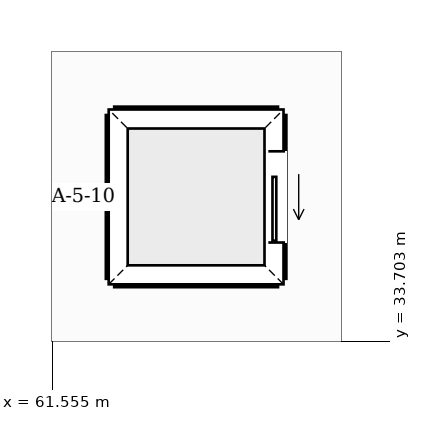
"""IFC4 building model, lengths in metres.
Left out: names, types, materials, properties, quantities, classifications, styles, units other than length and angle.
Written with IfcOpenShell. Run it as: python <this file> out.ifc"""

import sys

from ifc_helpers import new_model, si_unit, direction, frame, frame_2d, origin, place, context, subcontext, project, spatial, rectangle, extrude, element, fill, save


model = new_model("IFC4")
c1 = context("Model", 3, precision=1e-05, world=origin(), true_north=direction((0.0, 1.0)))
c2 = subcontext(c1, "Body", "Model", "MODEL_VIEW")
j1 = project(units=[si_unit("LENGTHUNIT", "METRE"), si_unit("PLANEANGLEUNIT", "RADIAN")], contexts=[c1])
p1 = place(None, origin())
s1 = spatial("IfcSite", under=j1, at=p1, CompositionType="ELEMENT")
p2 = place(p1, origin())
s2 = spatial("IfcBuilding", under=s1, at=p2, CompositionType="ELEMENT")
p3 = place(p2, frame((0.0, 0.0, -5.4)))
s3 = spatial("IfcBuildingStorey", under=s2, at=p3, CompositionType="ELEMENT", Elevation=-5.4)
for number, where, z_axis, x_axis in (
    (1, (62.39, 36.66, 0.0), (0.0, 0.0, 1.0), (1.0, 0.0, 0.0)),
    (2, (62.39, 34.54, 0.0), (0.0, 0.0, 1.0), (1.0, 0.0, 0.0)),
):
    element("IfcWall", number, at=place(p3, frame(where, z_axis=z_axis, x_axis=x_axis)), inside=s3, PredefinedType="SHEAR", context=c2, shape_type="SweptSolid", body=[
        extrude(rectangle(XDim=2.12, YDim=0.22, at=frame_2d((1.06, 0.0))), origin(), (0.0, 0.0, 1.0), 5.12),
    ])
p4 = place(p3, frame((64.51, 34.54, 0.0), z_axis=(0.0, 0.0, 1.0), x_axis=(0.0, 1.0, 0.0)))
e3 = element("IfcWall", 3, at=p4, inside=s3, PredefinedType="SHEAR", context=c2, shape_type="SweptSolid", body=[
    extrude(rectangle(XDim=2.12, YDim=0.22, at=frame_2d((1.06, 0.0))), origin(), (0.0, 0.0, 1.0), 5.12),
])
p5 = place(p4, frame((0.46, 0.0, 0.0)))
e4 = element("IfcOpeningElement", 4, at=p5, cuts=e3, PredefinedType="OPENING", context=c2, shape_type="SweptSolid", body=[
    extrude(rectangle(XDim=1.2, YDim=2.25, at=frame_2d((0.6, 1.125))), frame((0.0, 0.12, 0.0), z_axis=(0.0, -1.0, 0.0), x_axis=(1.0, 0.0, 0.0)), (0.0, 0.0, 1.0), 0.24),
])
p6 = place(p3, frame((62.39, 34.54, 0.0), z_axis=(0.0, 0.0, 1.0), x_axis=(0.0, 1.0, 0.0)))
e5 = element("IfcWall", 5, at=p6, inside=s3, PredefinedType="SHEAR", context=c2, shape_type="SweptSolid", body=[
    extrude(rectangle(XDim=2.12, YDim=0.22, at=frame_2d((1.06, 0.0))), origin(), (0.0, 0.0, 1.0), 5.12),
])
p7 = place(p5, origin())
e6 = element("IfcDoor", 6, at=p7, inside=s3, OperationType="SLIDING_TO_LEFT", PredefinedType="DOOR", context=c2, shape_type="SweptSolid", body=[
    extrude(rectangle(XDim=1.2, YDim=2.25, at=frame_2d((0.6, 1.125))), frame((0.0, 0.025, 0.0), z_axis=(0.0, -1.0, 0.0), x_axis=(1.0, 0.0, 0.0)), (0.0, 0.0, 1.0), 0.05),
])
fill(e4, e6)
save(model, sys.argv[1])
